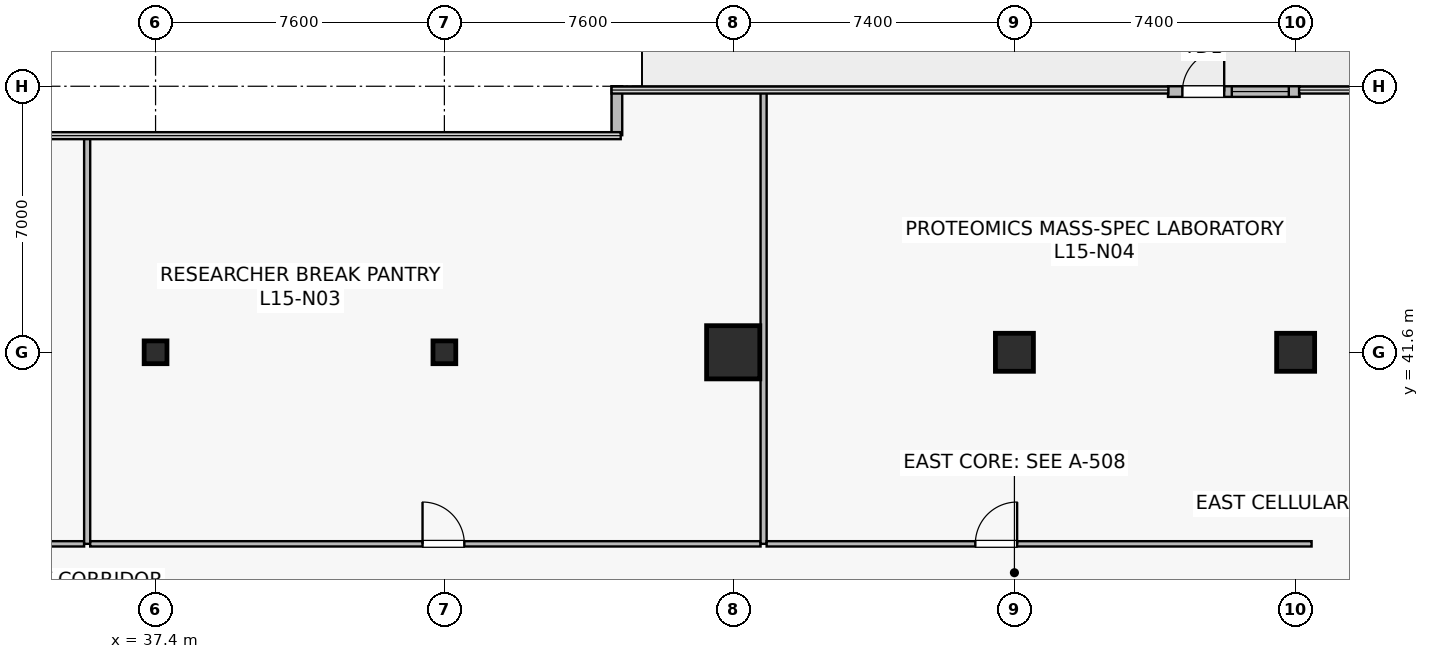
"""IFC4 building model, lengths in metres.
Left out: names, types, materials, properties, quantities, classifications, styles, units other than length and angle.
Written with IfcOpenShell. Run it as: python <this file> out.ifc"""

import sys

from ifc_helpers import new_model, si_unit, direction, frame, frame_2d, origin, origin_2d, place, context, subcontext, project, spatial, rectangle, hollow_rectangle, extrude, source, transform, mapped, element, fill, save


model = new_model("IFC4")
c1 = context("Model", 3, precision=1e-05, world=origin(), true_north=direction((0.0, 1.0)))
c2 = subcontext(c1, "Body", "Model", "MODEL_VIEW")
j1 = project(units=[si_unit("LENGTHUNIT", "METRE"), si_unit("PLANEANGLEUNIT", "RADIAN")], contexts=[c1])
p1 = place(None, origin())
s1 = spatial("IfcSite", under=j1, at=p1, CompositionType="ELEMENT")
p2 = place(p1, origin())
s2 = spatial("IfcBuilding", under=s1, at=p2, CompositionType="ELEMENT")
p3 = place(p2, frame((0.0, 0.0, 62.1)))
s3 = spatial("IfcBuildingStorey", under=s2, at=p3, CompositionType="ELEMENT", Elevation=62.1)
m1 = source(origin(), c2, "Body", "SweptSolid", [
    extrude(rectangle(XDim=1.4, YDim=1.4, at=origin_2d()), origin(), (0.0, 0.0, 1.0), 4.1),
])
p4 = place(p3, frame((52.6, 41.6, 0.0), z_axis=(0.0, 0.0, 1.0), x_axis=(1.0, 0.0, 0.0)))
e1 = element("IfcColumn", 1, at=p4, inside=s3, PredefinedType="COLUMN", context=c2, shape_type="MappedRepresentation", body=[
    mapped(m1, transform((0.0, 0.0, 0.0), scale=1.0)),
])
m2 = source(origin(), c2, "Body", "SweptSolid", [
    extrude(rectangle(XDim=1.0, YDim=1.0, at=origin_2d()), origin(), (0.0, 0.0, 1.0), 4.1),
])
for number, where, z_axis, x_axis in (
    (2, (60.0, 41.6, 0.0), (0.0, 0.0, 1.0), (1.0, 0.0, 0.0)),
    (3, (67.4, 41.6, 0.0), (0.0, 0.0, 1.0), (1.0, 0.0, 0.0)),
):
    element("IfcColumn", number, at=place(p3, frame(where, z_axis=z_axis, x_axis=x_axis)), inside=s3, PredefinedType="COLUMN", context=c2, shape_type="MappedRepresentation", body=[
        mapped(m2, transform((0.0, 0.0, 0.0), scale=1.0)),
    ])
m3 = source(origin(), c2, "Body", "SweptSolid", [
    extrude(hollow_rectangle(XDim=0.6, YDim=0.6, WallThickness=0.028, at=origin_2d()), origin(), (0.0, 0.0, 1.0), 4.1),
])
for number, where, z_axis, x_axis in (
    (4, (37.4, 41.6, 0.0), (0.0, 0.0, 1.0), (1.0, 0.0, 0.0)),
    (5, (45.0, 41.6, 0.0), (0.0, 0.0, 1.0), (1.0, 0.0, 0.0)),
):
    element("IfcColumn", number, at=place(p3, frame(where, z_axis=z_axis, x_axis=x_axis)), inside=s3, PredefinedType="COLUMN", context=c2, shape_type="MappedRepresentation", body=[
        mapped(m3, transform((0.0, 0.0, 0.0), scale=1.0)),
    ])
p5 = place(p3, frame((64.042, 48.46, 0.0), z_axis=(0.0, 0.0, 1.0), x_axis=(1.0, 0.0, 0.0)))
e6 = element("IfcWall", 6, at=p5, inside=s3, PredefinedType="STANDARD", context=c2, shape_type="SweptSolid", body=[
    extrude(rectangle(XDim=3.461, YDim=0.28, at=frame_2d((1.73, 0.0))), origin(), (0.0, 0.0, 1.0), 3.78),
])
p6 = place(p5, frame((0.378, 0.0, 0.0)))
e7 = element("IfcOpeningElement", 7, at=p6, cuts=e6, PredefinedType="OPENING", context=c2, shape_type="SweptSolid", body=[
    extrude(rectangle(XDim=1.1, YDim=2.2, at=frame_2d((0.55, 1.1))), frame((0.0, 0.15, 0.0), z_axis=(0.0, -1.0, 0.0), x_axis=(1.0, 0.0, 0.0)), (0.0, 0.0, 1.0), 0.3),
])
p7 = place(p5, frame((1.678, 0.0, 0.9)))
e8 = element("IfcOpeningElement", 8, at=p7, cuts=e6, PredefinedType="OPENING", context=c2, shape_type="SweptSolid", body=[
    extrude(rectangle(XDim=1.5, YDim=2.2, at=frame_2d((0.75, 1.1))), frame((0.0, 0.15, 0.0), z_axis=(0.0, -1.0, 0.0), x_axis=(1.0, 0.0, 0.0)), (0.0, 0.0, 1.0), 0.3),
])
p8 = place(p3, frame((49.54, 48.6, 0.0), z_axis=(0.0, 0.0, 1.0), x_axis=(0.0, -1.0, 0.0)))
e9 = element("IfcWall", 9, at=p8, inside=s3, PredefinedType="STANDARD", context=c2, shape_type="SweptSolid", body=[
    extrude(rectangle(XDim=1.288, YDim=0.28, at=frame_2d((0.644, 0.0))), origin(), (0.0, 0.0, 1.0), 3.78),
])
p9 = place(p3, frame((18.88, 36.56, 0.0), z_axis=(0.0, 0.0, 1.0), x_axis=(1.0, 0.0, 0.0)))
e10 = element("IfcWall", 10, at=p9, inside=s3, PredefinedType="PARTITIONING", context=c2, shape_type="SweptSolid", body=[
    extrude(rectangle(XDim=16.64, YDim=0.14, at=frame_2d((8.32, 0.0))), origin(), (0.0, 0.0, 1.0), 3.115),
])
p10 = place(p9, frame((6.434, 0.0, 0.0)))
e11 = element("IfcOpeningElement", 11, at=p10, cuts=e10, PredefinedType="OPENING", context=c2, shape_type="SweptSolid", body=[
    extrude(rectangle(XDim=1.1, YDim=2.18, at=frame_2d((0.55, 1.09))), frame((0.0, 0.08, 0.0), z_axis=(0.0, -1.0, 0.0), x_axis=(1.0, 0.0, 0.0)), (0.0, 0.0, 1.0), 0.16),
])
p11 = place(p3, frame((35.6, 36.56, 0.0), z_axis=(0.0, 0.0, 1.0), x_axis=(0.0, 1.0, 0.0)))
e12 = element("IfcWall", 12, at=p11, inside=s3, PredefinedType="PARTITIONING", context=c2, shape_type="SweptSolid", body=[
    extrude(rectangle(XDim=10.73, YDim=0.16, at=frame_2d((5.365, 0.0))), origin(), (0.0, 0.0, 1.0), 3.015),
])
p12 = place(p3, frame((35.68, 36.56, 0.0), z_axis=(0.0, 0.0, 1.0), x_axis=(1.0, 0.0, 0.0)))
e13 = element("IfcWall", 13, at=p12, inside=s3, PredefinedType="PARTITIONING", context=c2, shape_type="SweptSolid", body=[
    extrude(rectangle(XDim=17.64, YDim=0.14, at=frame_2d((8.82, 0.0))), origin(), (0.0, 0.0, 1.0), 3.115),
])
p13 = place(p12, frame((8.745, 0.0, 0.0)))
e14 = element("IfcOpeningElement", 14, at=p13, cuts=e13, PredefinedType="OPENING", context=c2, shape_type="SweptSolid", body=[
    extrude(rectangle(XDim=1.1, YDim=2.18, at=frame_2d((0.55, 1.09))), frame((0.0, 0.08, 0.0), z_axis=(0.0, -1.0, 0.0), x_axis=(1.0, 0.0, 0.0)), (0.0, 0.0, 1.0), 0.16),
])
p14 = place(p3, frame((53.4, 36.56, 0.0), z_axis=(0.0, 0.0, 1.0), x_axis=(0.0, 1.0, 0.0)))
e15 = element("IfcWall", 15, at=p14, inside=s3, PredefinedType="PARTITIONING", context=c2, shape_type="SweptSolid", body=[
    extrude(rectangle(XDim=11.93, YDim=0.16, at=frame_2d((5.965, 0.0))), origin(), (0.0, 0.0, 1.0), 3.015),
])
p15 = place(p3, frame((53.48, 36.56, 0.0), z_axis=(0.0, 0.0, 1.0), x_axis=(1.0, 0.0, 0.0)))
e16 = element("IfcWall", 16, at=p15, inside=s3, PredefinedType="PARTITIONING", context=c2, shape_type="SweptSolid", body=[
    extrude(rectangle(XDim=14.34, YDim=0.14, at=frame_2d((7.17, 0.0))), origin(), (0.0, 0.0, 1.0), 3.115),
])
p16 = place(p15, frame((5.491, 0.0, 0.0)))
e17 = element("IfcOpeningElement", 17, at=p16, cuts=e16, PredefinedType="OPENING", context=c2, shape_type="SweptSolid", body=[
    extrude(rectangle(XDim=1.1, YDim=2.18, at=frame_2d((0.55, 1.09))), frame((0.0, 0.08, 0.0), z_axis=(0.0, -1.0, 0.0), x_axis=(1.0, 0.0, 0.0)), (0.0, 0.0, 1.0), 0.16),
])
m4 = source(origin(), c2, "Body", "SweptSolid", [
    extrude(rectangle(XDim=1.1, YDim=2.2, at=frame_2d((0.55, 1.1))), frame((0.0, 0.025, 0.0), z_axis=(0.0, -1.0, 0.0), x_axis=(1.0, 0.0, 0.0)), (0.0, 0.0, 1.0), 0.05),
])
p17 = place(p6, origin())
e18 = element("IfcDoor", 18, at=p17, inside=s3, OperationType="SINGLE_SWING_RIGHT", PredefinedType="DOOR", context=c2, shape_type="MappedRepresentation", body=[
    mapped(m4, transform((0.0, 0.0, 0.0), scale=1.0)),
])
fill(e7, e18)
m5 = source(origin(), c2, "Body", "SweptSolid", [
    extrude(rectangle(XDim=1.5, YDim=2.2, at=frame_2d((0.75, 1.1))), frame((0.0, 0.03, 0.0), z_axis=(0.0, -1.0, 0.0), x_axis=(1.0, 0.0, 0.0)), (0.0, 0.0, 1.0), 0.06),
])
p18 = place(p7, origin())
e19 = element("IfcWindow", 19, at=p18, inside=s3, PartitioningType="SINGLE_PANEL", PredefinedType="WINDOW", context=c2, shape_type="MappedRepresentation", body=[
    mapped(m5, transform((0.0, 0.0, 0.0), scale=1.0)),
])
fill(e8, e19)
m6 = source(origin(), c2, "Body", "SweptSolid", [
    extrude(rectangle(XDim=1.1, YDim=2.18, at=frame_2d((0.55, 1.09))), frame((0.0, 0.025, 0.0), z_axis=(0.0, -1.0, 0.0), x_axis=(1.0, 0.0, 0.0)), (0.0, 0.0, 1.0), 0.05),
])
p19 = place(p13, origin())
e20 = element("IfcDoor", 20, at=p19, inside=s3, OperationType="SINGLE_SWING_LEFT", PredefinedType="DOOR", context=c2, shape_type="MappedRepresentation", body=[
    mapped(m6, transform((0.0, 0.0, 0.0), scale=1.0)),
])
fill(e14, e20)
p20 = place(p16, origin())
e21 = element("IfcDoor", 21, at=p20, inside=s3, OperationType="SINGLE_SWING_RIGHT", PredefinedType="DOOR", context=c2, shape_type="MappedRepresentation", body=[
    mapped(m6, transform((0.0, 0.0, 0.0), scale=1.0)),
])
fill(e17, e21)
save(model, sys.argv[1])
